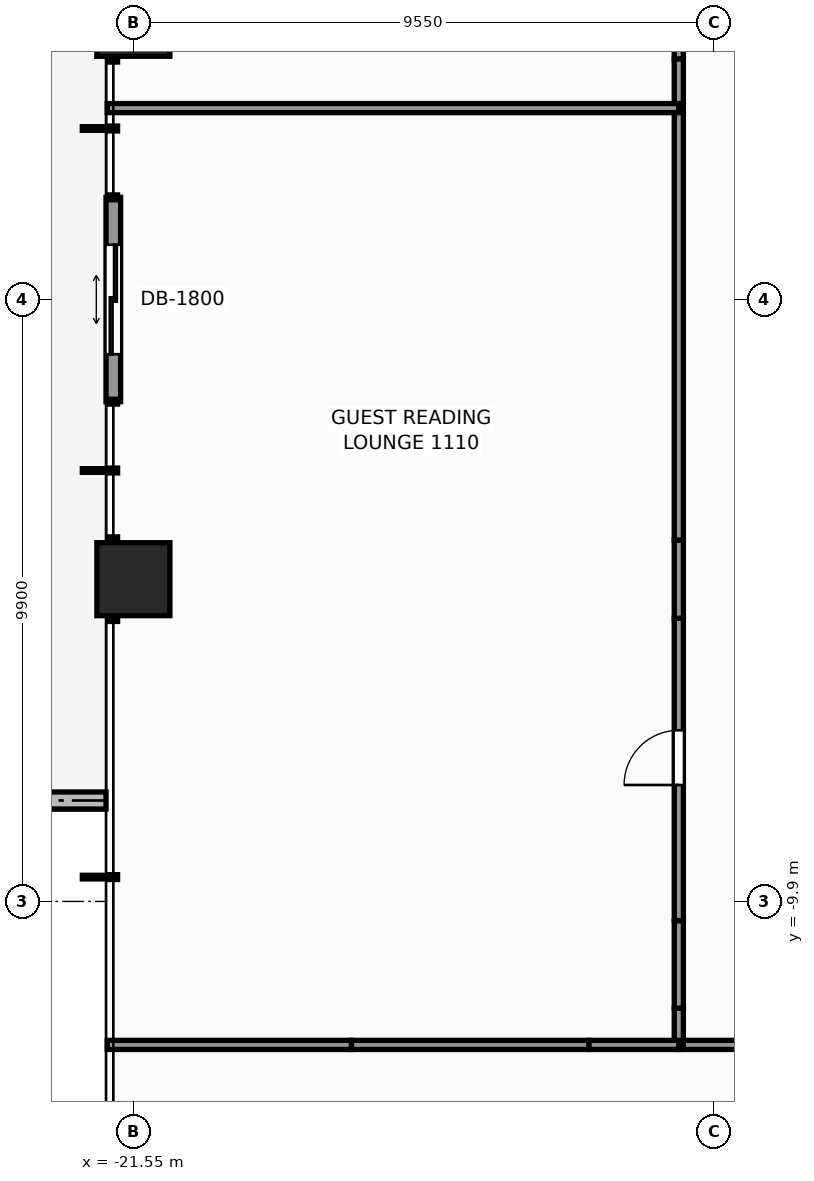
"""IFC4 building model, lengths in metres.
Left out: names, types, materials, properties, quantities, classifications, styles, units other than length and angle.
Written with IfcOpenShell. Run it as: python <this file> out.ifc"""

import sys

from ifc_helpers import new_model, si_unit, direction, frame, frame_2d, origin, origin_2d, place, context, subcontext, project, spatial, rectangle, extrude, element, fill, save


model = new_model("IFC4")
c1 = context("Model", 3, precision=1e-05, world=origin(), true_north=direction((0.0, 1.0)))
c2 = subcontext(c1, "Body", "Model", "MODEL_VIEW")
j1 = project(units=[si_unit("LENGTHUNIT", "METRE"), si_unit("PLANEANGLEUNIT", "RADIAN")], contexts=[c1])
p1 = place(None, origin())
s1 = spatial("IfcSite", under=j1, at=p1, CompositionType="ELEMENT")
p2 = place(p1, origin())
s2 = spatial("IfcBuilding", under=s1, at=p2, CompositionType="ELEMENT")
p3 = place(p2, frame((0.0, 0.0, 40.3)))
s3 = spatial("IfcBuildingStorey", under=s2, at=p3, CompositionType="ELEMENT", Elevation=40.3)
for number, where, z_axis, x_axis in (
    (1, (-21.55, -4.6, 0.0), (0.0, 0.0, 1.0), (1.0, 0.0, 0.0)),
    (2, (-21.55, 4.6, 0.0), (0.0, 0.0, 1.0), (1.0, 0.0, 0.0)),
):
    element("IfcColumn", number, at=place(p3, frame(where, z_axis=z_axis, x_axis=x_axis)), inside=s3, PredefinedType="COLUMN", context=c2, shape_type="SweptSolid", body=[
        extrude(rectangle(XDim=1.2, YDim=1.2, at=origin_2d()), origin(), (0.0, 0.0, 1.0), 3.3),
    ])
p4 = place(p3, frame((-24.006, -8.24, -0.06), z_axis=(0.0, 0.0, 1.0), x_axis=(1.0, 0.0, 0.0)))
e3 = element("IfcWall", 3, at=p4, inside=s3, PredefinedType="PARAPET", context=c2, shape_type="SweptSolid", body=[
    extrude(rectangle(XDim=2.006, YDim=0.28, at=frame_2d((1.003, 0.0))), origin(), (0.0, 0.0, 1.0), 0.42),
])
p5 = place(p3, frame((-21.88, -1.68, 0.0), z_axis=(0.0, 0.0, 1.0), x_axis=(0.0, 1.0, 0.0)))
e4 = element("IfcWall", 4, at=p5, inside=s3, PredefinedType="STANDARD", context=c2, shape_type="SweptSolid", body=[
    extrude(rectangle(XDim=3.36, YDim=0.24, at=frame_2d((1.68, 0.0))), origin(), (0.0, 0.0, 1.0), 3.06),
])
p6 = place(p5, frame((0.78, 0.0, 0.0)))
e5 = element("IfcOpeningElement", 5, at=p6, cuts=e4, PredefinedType="OPENING", context=c2, shape_type="SweptSolid", body=[
    extrude(rectangle(XDim=1.8, YDim=2.2, at=frame_2d((0.9, 1.1))), frame((0.0, 0.13, 0.0), z_axis=(0.0, -1.0, 0.0), x_axis=(1.0, 0.0, 0.0)), (0.0, 0.0, 1.0), 0.26),
])
p7 = place(p3, frame((-12.58, -12.26, 0.0), z_axis=(0.0, 0.0, 1.0), x_axis=(1.0, 0.0, 0.0)))
e6 = element("IfcWall", 6, at=p7, inside=s3, PredefinedType="PARTITIONING", context=c2, shape_type="SweptSolid", body=[
    extrude(rectangle(XDim=1.049, YDim=0.15, at=frame_2d((0.524, 0.0))), origin(), (0.0, 0.0, 1.0), 3.06),
])
p8 = place(p3, frame((-12.58, -12.26, 0.0), z_axis=(0.0, 0.0, 1.0), x_axis=(0.0, 1.0, 0.0)))
e7 = element("IfcWall", 7, at=p8, inside=s3, PredefinedType="PARTITIONING", context=c2, shape_type="SweptSolid", body=[
    extrude(rectangle(XDim=0.605, YDim=0.15, at=frame_2d((0.303, 0.0))), origin(), (0.0, 0.0, 1.0), 3.06),
])
p9 = place(p3, frame((-12.58, -11.655, 0.0), z_axis=(0.0, 0.0, 1.0), x_axis=(0.0, 1.0, 0.0)))
e8 = element("IfcWall", 8, at=p9, inside=s3, PredefinedType="PARTITIONING", context=c2, shape_type="SweptSolid", body=[
    extrude(rectangle(XDim=1.439, YDim=0.15, at=frame_2d((0.72, 0.0))), origin(), (0.0, 0.0, 1.0), 1.245),
])
p10 = place(p3, frame((-12.58, -10.216, 0.0), z_axis=(0.0, 0.0, 1.0), x_axis=(0.0, 1.0, 0.0)))
e9 = element("IfcWall", 9, at=p10, inside=s3, PredefinedType="PARTITIONING", context=c2, shape_type="SweptSolid", body=[
    extrude(rectangle(XDim=4.974, YDim=0.15, at=frame_2d((2.487, 0.0))), origin(), (0.0, 0.0, 1.0), 3.06),
])
p11 = place(p10, frame((2.23, 0.0, 0.0)))
e10 = element("IfcOpeningElement", 10, at=p11, cuts=e9, PredefinedType="OPENING", context=c2, shape_type="SweptSolid", body=[
    extrude(rectangle(XDim=0.9, YDim=2.06, at=frame_2d((0.45, 1.03))), frame((0.0, 0.085, 0.0), z_axis=(0.0, -1.0, 0.0), x_axis=(1.0, 0.0, 0.0)), (0.0, 0.0, 1.0), 0.17),
])
p12 = place(p3, frame((-12.58, -5.242, 0.0), z_axis=(0.0, 0.0, 1.0), x_axis=(0.0, 1.0, 0.0)))
e11 = element("IfcWall", 11, at=p12, inside=s3, PredefinedType="PARTITIONING", context=c2, shape_type="SweptSolid", body=[
    extrude(rectangle(XDim=1.284, YDim=0.15, at=frame_2d((0.642, 0.0))), origin(), (0.0, 0.0, 1.0), 1.245),
])
p13 = place(p3, frame((-12.58, -3.958, 0.0), z_axis=(0.0, 0.0, 1.0), x_axis=(0.0, 1.0, 0.0)))
e12 = element("IfcWall", 12, at=p13, inside=s3, PredefinedType="PARTITIONING", context=c2, shape_type="SweptSolid", body=[
    extrude(rectangle(XDim=7.916, YDim=0.15, at=frame_2d((3.958, 0.0))), origin(), (0.0, 0.0, 1.0), 2.585),
])
p14 = place(p3, frame((-12.58, 3.958, 0.0), z_axis=(0.0, 0.0, 1.0), x_axis=(0.0, 1.0, 0.0)))
e13 = element("IfcWall", 13, at=p14, inside=s3, PredefinedType="PARTITIONING", context=c2, shape_type="SweptSolid", body=[
    extrude(rectangle(XDim=1.284, YDim=0.15, at=frame_2d((0.642, 0.0))), origin(), (0.0, 0.0, 1.0), 1.245),
])
p15 = place(p3, frame((-21.98, -12.26, 0.0), z_axis=(0.0, 0.0, 1.0), x_axis=(1.0, 0.0, 0.0)))
e14 = element("IfcWall", 14, at=p15, inside=s3, PredefinedType="PARTITIONING", context=c2, shape_type="SweptSolid", body=[
    extrude(rectangle(XDim=4.017, YDim=0.15, at=frame_2d((2.008, 0.0))), origin(), (0.0, 0.0, 1.0), 2.429),
])
p16 = place(p3, frame((-17.963, -12.26, 0.0), z_axis=(0.0, 0.0, 1.0), x_axis=(1.0, 0.0, 0.0)))
e15 = element("IfcWall", 15, at=p16, inside=s3, PredefinedType="PARTITIONING", context=c2, shape_type="SweptSolid", body=[
    extrude(rectangle(XDim=3.907, YDim=0.15, at=frame_2d((1.954, 0.0))), origin(), (0.0, 0.0, 1.0), 1.245),
])
p17 = place(p3, frame((-14.056, -12.26, 0.0), z_axis=(0.0, 0.0, 1.0), x_axis=(1.0, 0.0, 0.0)))
e16 = element("IfcWall", 16, at=p17, inside=s3, PredefinedType="PARTITIONING", context=c2, shape_type="SweptSolid", body=[
    extrude(rectangle(XDim=1.476, YDim=0.15, at=frame_2d((0.738, 0.0))), origin(), (0.0, 0.0, 1.0), 3.06),
])
p18 = place(p3, frame((-21.98, 3.148, 0.0), z_axis=(0.0, 0.0, 1.0), x_axis=(1.0, 0.0, 0.0)))
e17 = element("IfcWall", 17, at=p18, inside=s3, PredefinedType="PARTITIONING", context=c2, shape_type="SweptSolid", body=[
    extrude(rectangle(XDim=9.4, YDim=0.15, at=frame_2d((4.7, 0.0))), origin(), (0.0, 0.0, 1.0), 2.429),
])
p19 = place(p6, origin())
e18 = element("IfcDoor", 18, at=p19, inside=s3, OperationType="DOUBLE_DOOR_SLIDING", PredefinedType="DOOR", context=c2, shape_type="SweptSolid", body=[
    extrude(rectangle(XDim=1.8, YDim=2.2, at=frame_2d((0.9, 1.1))), frame((0.0, 0.025, 0.0), z_axis=(0.0, -1.0, 0.0), x_axis=(1.0, 0.0, 0.0)), (0.0, 0.0, 1.0), 0.05),
])
fill(e5, e18)
p20 = place(p11, origin())
e19 = element("IfcDoor", 19, at=p20, inside=s3, OperationType="SINGLE_SWING_LEFT", PredefinedType="DOOR", context=c2, shape_type="SweptSolid", body=[
    extrude(rectangle(XDim=0.9, YDim=2.06, at=frame_2d((0.45, 1.03))), frame((0.0, 0.025, 0.0), z_axis=(0.0, -1.0, 0.0), x_axis=(1.0, 0.0, 0.0)), (0.0, 0.0, 1.0), 0.05),
])
fill(e10, e19)
save(model, sys.argv[1])
